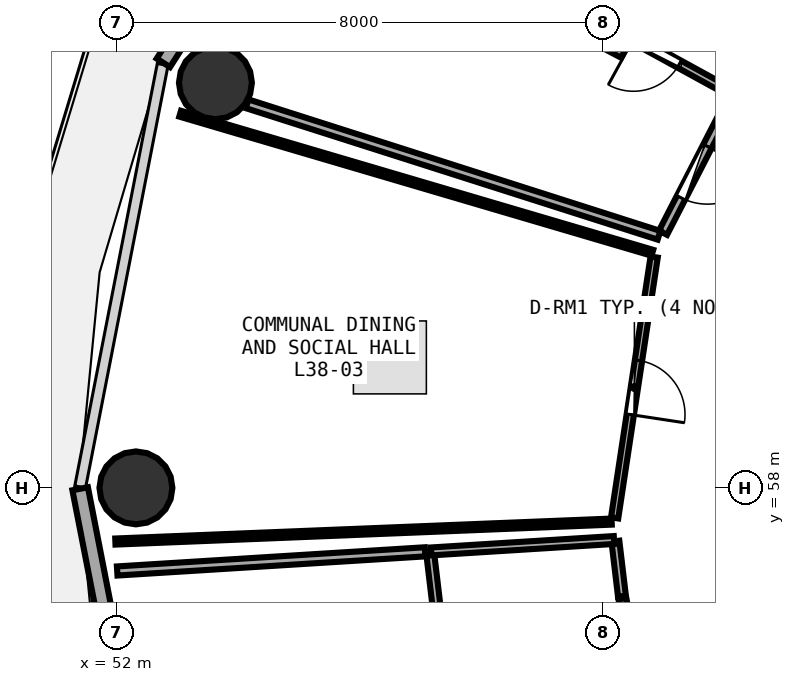
"""IFC4 building model, lengths in metres.
Left out: names, types, materials, properties, quantities, classifications, styles, units other than length and angle.
Written with IfcOpenShell. Run it as: python <this file> out.ifc"""

import sys

from ifc_helpers import new_model, si_unit, direction, frame, frame_2d, origin, origin_2d, place, context, subcontext, project, spatial, rectangle, circle, extrude, element, fill, save


model = new_model("IFC4")
c1 = context("Model", 3, precision=1e-05, world=origin(), true_north=direction((0.0, 1.0)))
c2 = subcontext(c1, "Body", "Model", "MODEL_VIEW")
j1 = project(units=[si_unit("LENGTHUNIT", "METRE"), si_unit("PLANEANGLEUNIT", "RADIAN")], contexts=[c1])
p1 = place(None, origin())
s1 = spatial("IfcSite", under=j1, at=p1, CompositionType="ELEMENT")
p2 = place(p1, origin())
s2 = spatial("IfcBuilding", under=s1, at=p2, CompositionType="ELEMENT")
p3 = place(p2, frame((0.0, 0.0, 150.6)))
s3 = spatial("IfcBuildingStorey", under=s2, at=p3, CompositionType="ELEMENT", Elevation=150.6)
for number, where, z_axis, x_axis in (
    (1, (53.627, 64.663, 0.0), (0.0, 0.0, 1.0), (1.0, 0.0, 0.0)),
    (2, (52.32, 58.0, 0.0), (0.0, 0.0, 1.0), (1.0, 0.0, 0.0)),
):
    element("IfcColumn", number, at=place(p3, frame(where, z_axis=z_axis, x_axis=x_axis)), inside=s3, PredefinedType="COLUMN", context=c2, shape_type="SweptSolid", body=[
        extrude(circle(Radius=0.6, at=origin_2d()), origin(), (0.0, 0.0, 1.0), 3.75),
    ])
p4 = place(p3, frame((56.679, 71.1, 0.0), z_axis=(0.0, 0.0, 1.0), x_axis=(-0.538801521808, -0.842432739213, 0.0)))
e3 = element("IfcWall", 3, at=p4, inside=s3, PredefinedType="SOLIDWALL", context=c2, shape_type="SweptSolid", body=[
    extrude(rectangle(XDim=7.253, YDim=0.26, at=frame_2d((3.627, 0.0))), origin(), (0.0, 0.0, 1.0), 3.475),
])
p5 = place(p4, frame((3.152, 0.0, 0.0)))
e4 = element("IfcOpeningElement", 4, at=p5, cuts=e3, PredefinedType="OPENING", context=c2, shape_type="SweptSolid", body=[
    extrude(rectangle(XDim=0.95, YDim=2.1, at=frame_2d((0.475, 1.05))), frame((0.0, 0.14, 0.0), z_axis=(0.0, -1.0, 0.0), x_axis=(1.0, 0.0, 0.0)), (0.0, 0.0, 1.0), 0.28),
])
p6 = place(p4, frame((4.452, 0.0, 0.85)))
e5 = element("IfcOpeningElement", 5, at=p6, cuts=e3, PredefinedType="OPENING", context=c2, shape_type="SweptSolid", body=[
    extrude(rectangle(XDim=1.2, YDim=1.45, at=frame_2d((0.6, 0.725))), frame((0.0, 0.14, 0.0), z_axis=(0.0, -1.0, 0.0), x_axis=(1.0, 0.0, 0.0)), (0.0, 0.0, 1.0), 0.28),
])
p7 = place(p3, frame((51.403, 57.985, 0.0), z_axis=(0.0, 0.0, 1.0), x_axis=(0.191716984769, -0.981450252306, 0.0)))
e6 = element("IfcWall", 6, at=p7, inside=s3, PredefinedType="SOLIDWALL", context=c2, shape_type="SweptSolid", body=[
    extrude(rectangle(XDim=7.079, YDim=0.26, at=frame_2d((3.54, 0.0))), origin(), (0.0, 0.0, 1.0), 3.475),
])
p8 = place(p7, frame((2.74, 0.0, 0.85)))
e7 = element("IfcOpeningElement", 7, at=p8, cuts=e6, PredefinedType="OPENING", context=c2, shape_type="SweptSolid", body=[
    extrude(rectangle(XDim=1.6, YDim=1.45, at=frame_2d((0.8, 0.725))), frame((0.0, 0.14, 0.0), z_axis=(0.0, -1.0, 0.0), x_axis=(1.0, 0.0, 0.0)), (0.0, 0.0, 1.0), 0.28),
])
p9 = place(p3, frame((62.131, 64.489, 0.0), z_axis=(0.0, 0.0, 1.0), x_axis=(-0.87680194327, 0.480851694681, 0.0)))
e8 = element("IfcWall", 8, at=p9, inside=s3, PredefinedType="PLUMBINGWALL", context=c2, shape_type="SweptSolid", body=[
    extrude(rectangle(XDim=2.855, YDim=0.13, at=frame_2d((1.428, 0.0))), origin(), (0.0, 0.0, 1.0), 2.975),
])
p10 = place(p9, frame((0.998, 0.0, 0.0)))
e9 = element("IfcOpeningElement", 9, at=p10, cuts=e8, PredefinedType="OPENING", context=c2, shape_type="SweptSolid", body=[
    extrude(rectangle(XDim=0.86, YDim=2.05, at=frame_2d((0.43, 1.025))), frame((0.0, 0.075, 0.0), z_axis=(0.0, -1.0, 0.0), x_axis=(1.0, 0.0, 0.0)), (0.0, 0.0, 1.0), 0.15),
])
p11 = place(p3, frame((62.015, 64.192, 0.0), z_axis=(0.0, 0.0, 1.0), x_axis=(-0.457234963971, -0.889345932538, 0.0)))
e10 = element("IfcWall", 10, at=p11, inside=s3, PredefinedType="PARTITIONING", context=c2, shape_type="SweptSolid", body=[
    extrude(rectangle(XDim=2.245, YDim=0.15, at=frame_2d((1.122, 0.0))), origin(), (0.0, 0.0, 1.0), 3.235),
])
p12 = place(p11, frame((0.647, 0.0, 0.0)))
e11 = element("IfcOpeningElement", 11, at=p12, cuts=e10, PredefinedType="OPENING", context=c2, shape_type="SweptSolid", body=[
    extrude(rectangle(XDim=0.95, YDim=2.08, at=frame_2d((0.475, 1.04))), frame((0.0, 0.085, 0.0), z_axis=(0.0, -1.0, 0.0), x_axis=(1.0, 0.0, 0.0)), (0.0, 0.0, 1.0), 0.17),
])
p13 = place(p3, frame((60.843, 61.796, 0.0), z_axis=(0.0, 0.0, 1.0), x_axis=(-0.149807046494, -0.988715251638, 0.0)))
e12 = element("IfcWall", 12, at=p13, inside=s3, PredefinedType="PARTITIONING", context=c2, shape_type="SweptSolid", body=[
    extrude(rectangle(XDim=4.338, YDim=0.12, at=frame_2d((2.169, 0.0))), origin(), (0.0, 0.0, 1.0), 2.975),
])
p14 = place(p13, frame((1.719, 0.0, 0.0)))
e13 = element("IfcOpeningElement", 13, at=p14, cuts=e12, PredefinedType="OPENING", context=c2, shape_type="SweptSolid", body=[
    extrude(rectangle(XDim=0.9, YDim=2.08, at=frame_2d((0.45, 1.04))), frame((0.0, 0.07, 0.0), z_axis=(0.0, -1.0, 0.0), x_axis=(1.0, 0.0, 0.0)), (0.0, 0.0, 1.0), 0.14),
])
p15 = place(p3, frame((60.923, 62.154, 0.0), z_axis=(0.0, 0.0, 1.0), x_axis=(-0.952653075659, 0.304059397878, 0.0)))
e14 = element("IfcWall", 14, at=p15, inside=s3, PredefinedType="PARTITIONING", context=c2, shape_type="SweptSolid", body=[
    extrude(rectangle(XDim=7.112, YDim=0.15, at=frame_2d((3.556, 0.0))), origin(), (0.0, 0.0, 1.0), 3.175),
])
p16 = place(p3, frame((59.402, 65.63, 0.0), z_axis=(0.0, 0.0, 1.0), x_axis=(0.885450338388, -0.46473400806, 0.0)))
e15 = element("IfcWall", 15, at=p16, inside=s3, PredefinedType="PARTITIONING", context=c2, shape_type="SweptSolid", body=[
    extrude(rectangle(XDim=1.054, YDim=0.15, at=frame_2d((0.527, 0.0))), origin(), (0.0, 0.0, 1.0), 3.48),
])
p17 = place(p3, frame((60.144, 57.445, 0.0), z_axis=(0.0, 0.0, 1.0), x_axis=(-0.99919531507, -0.040108881097, 0.0)))
e16 = element("IfcWall", 16, at=p17, inside=s3, PredefinedType="PARTITIONING", context=c2, shape_type="SweptSolid", body=[
    extrude(rectangle(XDim=8.169, YDim=0.1, at=frame_2d((4.084, 0.0))), origin(), (0.0, 0.0, 1.0), 3.025),
])
p18 = place(p3, frame((53.047, 64.154, 0.0), z_axis=(0.0, 0.0, 1.0), x_axis=(0.959252584651, -0.282549958133, 0.0)))
e17 = element("IfcWall", 17, at=p18, inside=s3, PredefinedType="PARTITIONING", context=c2, shape_type="SweptSolid", body=[
    extrude(rectangle(XDim=8.096, YDim=0.1, at=frame_2d((4.048, 0.0))), origin(), (0.0, 0.0, 1.0), 3.025),
])
p19 = place(p3, frame((60.205, 57.124, 0.0), z_axis=(0.0, 0.0, 1.0), x_axis=(0.118797046487, -0.992918557459, 0.0)))
e18 = element("IfcWall", 18, at=p19, inside=s3, PredefinedType="PLUMBINGWALL", context=c2, shape_type="SweptSolid", body=[
    extrude(rectangle(XDim=0.912, YDim=0.13, at=frame_2d((0.456, 0.0))), origin(), (0.0, 0.0, 1.0), 3.48),
])
p20 = place(p3, frame((60.32, 56.178, 0.0), z_axis=(0.0, 0.0, 1.0), x_axis=(0.202067144879, -0.979371670491, 0.0)))
e19 = element("IfcWall", 19, at=p20, inside=s3, PredefinedType="PLUMBINGWALL", context=c2, shape_type="SweptSolid", body=[
    extrude(rectangle(XDim=0.915, YDim=0.13, at=frame_2d((0.457, 0.0))), origin(), (0.0, 0.0, 1.0), 3.48),
])
p21 = place(p3, frame((57.292, 55.819, 0.0), z_axis=(0.0, 0.0, 1.0), x_axis=(-0.11846804652, 0.992957865145, 0.0)))
e20 = element("IfcWall", 20, at=p21, inside=s3, PredefinedType="PLUMBINGWALL", context=c2, shape_type="SweptSolid", body=[
    extrude(rectangle(XDim=1.123, YDim=0.13, at=frame_2d((0.562, 0.0))), origin(), (0.0, 0.0, 1.0), 3.48),
])
p22 = place(p3, frame((57.176, 56.955, 0.0), z_axis=(0.0, 0.0, 1.0), x_axis=(0.998056675164, 0.062312704652, 0.0)))
e21 = element("IfcWall", 21, at=p22, inside=s3, PredefinedType="PLUMBINGWALL", context=c2, shape_type="SweptSolid", body=[
    extrude(rectangle(XDim=3.013, YDim=0.13, at=frame_2d((1.506, 0.0))), origin(), (0.0, 0.0, 1.0), 3.175),
])
p23 = place(p3, frame((52.012, 56.634, 0.0), z_axis=(0.0, 0.0, 1.0), x_axis=(0.998071814667, 0.062069741162, 0.0)))
e22 = element("IfcWall", 22, at=p23, inside=s3, PredefinedType="PARTITIONING", context=c2, shape_type="SweptSolid", body=[
    extrude(rectangle(XDim=5.074, YDim=0.15, at=frame_2d((2.537, 0.0))), origin(), (0.0, 0.0, 1.0), 3.025),
])
p24 = place(p10, origin())
e23 = element("IfcDoor", 23, at=p24, inside=s3, OperationType="SINGLE_SWING_RIGHT", PredefinedType="DOOR", context=c2, shape_type="SweptSolid", body=[
    extrude(rectangle(XDim=0.86, YDim=2.05, at=frame_2d((0.43, 1.025))), frame((0.0, 0.025, 0.0), z_axis=(0.0, -1.0, 0.0), x_axis=(1.0, 0.0, 0.0)), (0.0, 0.0, 1.0), 0.05),
])
fill(e9, e23)
p25 = place(p12, origin())
e24 = element("IfcDoor", 24, at=p25, inside=s3, OperationType="SINGLE_SWING_LEFT", PredefinedType="DOOR", context=c2, shape_type="SweptSolid", body=[
    extrude(rectangle(XDim=0.95, YDim=2.08, at=frame_2d((0.475, 1.04))), frame((0.0, 0.025, 0.0), z_axis=(0.0, -1.0, 0.0), x_axis=(1.0, 0.0, 0.0)), (0.0, 0.0, 1.0), 0.05),
])
fill(e11, e24)
p26 = place(p14, origin())
e25 = element("IfcDoor", 25, at=p26, inside=s3, OperationType="SINGLE_SWING_RIGHT", PredefinedType="DOOR", context=c2, shape_type="SweptSolid", body=[
    extrude(rectangle(XDim=0.9, YDim=2.08, at=frame_2d((0.45, 1.04))), frame((0.0, 0.025, 0.0), z_axis=(0.0, -1.0, 0.0), x_axis=(1.0, 0.0, 0.0)), (0.0, 0.0, 1.0), 0.05),
])
fill(e13, e25)
save(model, sys.argv[1])
